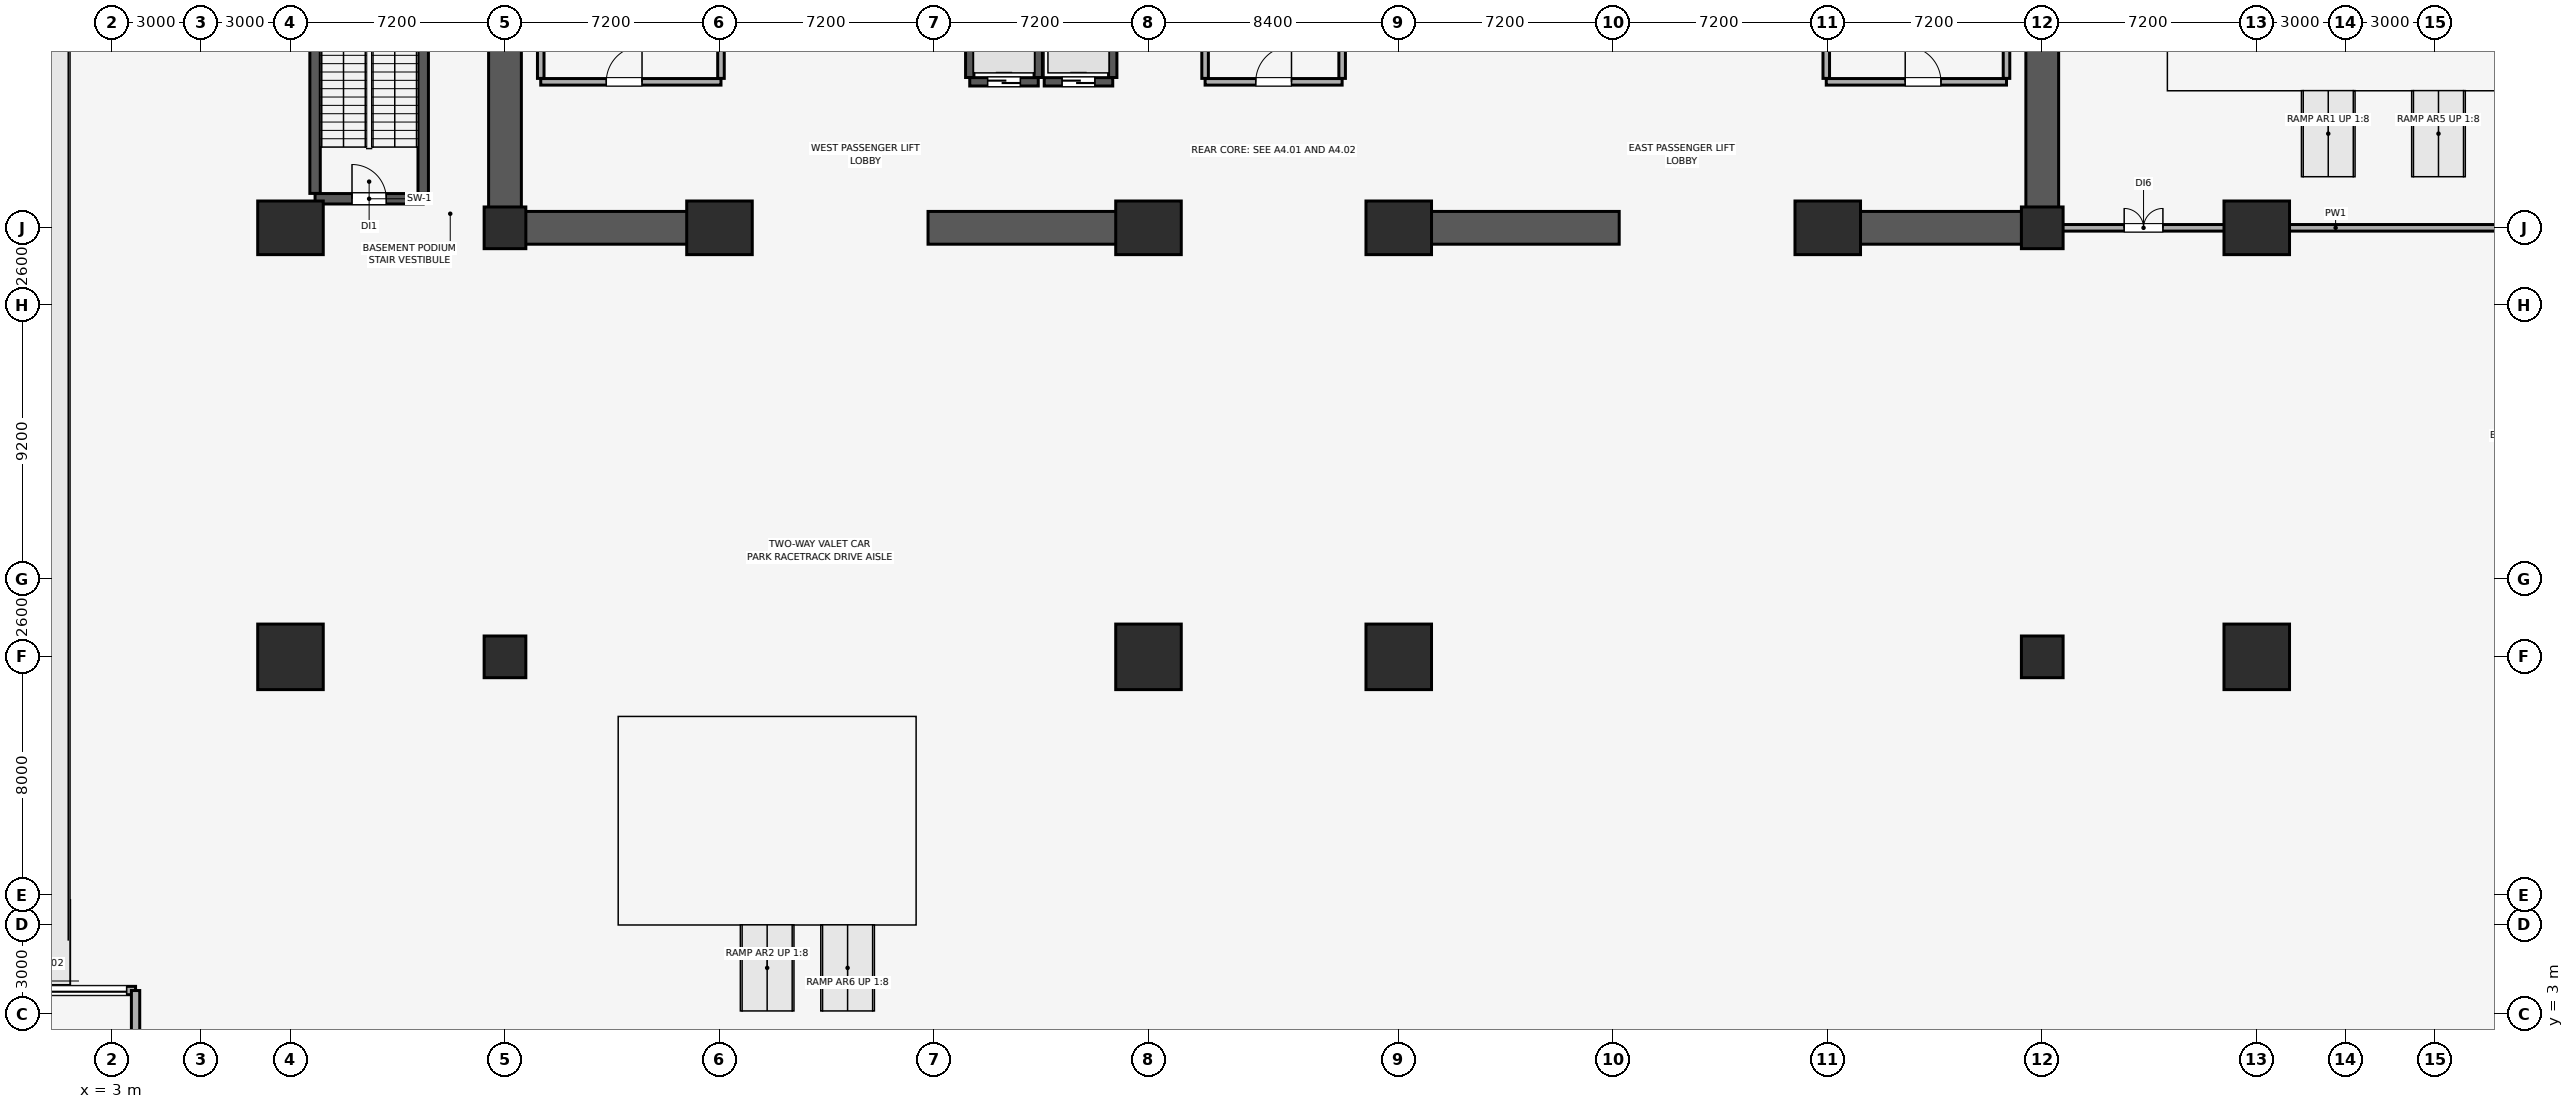
"""IFC4 building model, lengths in metres.
Left out: names, types, materials, properties, quantities, classifications, styles, units other than length and angle.
Written with IfcOpenShell. Run it as: python <this file> out.ifc"""

import sys

from ifc_helpers import new_model, si_unit, direction, frame, frame_2d, origin, origin_2d, place, context, subcontext, project, spatial, rectangle, circle, extrude, element, fill, save


model = new_model("IFC4")
c1 = context("Model", 3, precision=1e-05, world=origin(), true_north=direction((0.0, 1.0)))
c2 = subcontext(c1, "Body", "Model", "MODEL_VIEW")
j1 = project(units=[si_unit("LENGTHUNIT", "METRE"), si_unit("PLANEANGLEUNIT", "RADIAN")], contexts=[c1])
p1 = place(None, origin())
s1 = spatial("IfcSite", under=j1, at=p1, CompositionType="ELEMENT")
p2 = place(p1, origin())
s2 = spatial("IfcBuilding", under=s1, at=p2, CompositionType="ELEMENT")
p3 = place(p2, frame((0.0, 0.0, -9.2)))
s3 = spatial("IfcBuildingStorey", under=s2, at=p3, CompositionType="ELEMENT", Elevation=-9.2)
for number, where, z_axis, x_axis in (
    (1, (9.0, 15.0, 0.0), (0.0, 0.0, 1.0), (1.0, 0.0, 0.0)),
    (2, (37.8, 15.0, 0.0), (0.0, 0.0, 1.0), (1.0, 0.0, 0.0)),
    (3, (46.2, 15.0, 0.0), (0.0, 0.0, 1.0), (1.0, 0.0, 0.0)),
    (4, (75.0, 15.0, 0.0), (0.0, 0.0, 1.0), (1.0, 0.0, 0.0)),
):
    element("IfcColumn", number, at=place(p3, frame(where, z_axis=z_axis, x_axis=x_axis)), inside=s3, PredefinedType="USERDEFINED", context=c2, shape_type="SweptSolid", body=[
        extrude(circle(Radius=1.1, at=origin_2d()), origin(), (0.0, 0.0, 1.0), 4.3),
    ])
for number, where, z_axis, x_axis in (
    (5, (16.2, 15.0, 0.0), (0.0, 0.0, 1.0), (1.0, 0.0, 0.0)),
    (6, (67.8, 15.0, 0.0), (0.0, 0.0, 1.0), (1.0, 0.0, 0.0)),
):
    element("IfcColumn", number, at=place(p3, frame(where, z_axis=z_axis, x_axis=x_axis)), inside=s3, PredefinedType="COLUMN", context=c2, shape_type="SweptSolid", body=[
        extrude(rectangle(XDim=1.4, YDim=1.4, at=origin_2d()), origin(), (0.0, 0.0, 1.0), 4.3),
    ])
for number, where, z_axis, x_axis in (
    (7, (9.0, 29.4, 0.0), (0.0, 0.0, 1.0), (1.0, 0.0, 0.0)),
    (8, (23.4, 29.4, 0.0), (0.0, 0.0, 1.0), (1.0, 0.0, 0.0)),
    (9, (37.8, 29.4, 0.0), (0.0, 0.0, 1.0), (1.0, 0.0, 0.0)),
    (10, (46.2, 29.4, 0.0), (0.0, 0.0, 1.0), (1.0, 0.0, 0.0)),
    (11, (60.6, 29.4, 0.0), (0.0, 0.0, 1.0), (1.0, 0.0, 0.0)),
    (12, (75.0, 29.4, 0.0), (0.0, 0.0, 1.0), (1.0, 0.0, 0.0)),
):
    element("IfcColumn", number, at=place(p3, frame(where, z_axis=z_axis, x_axis=x_axis)), inside=s3, PredefinedType="USERDEFINED", context=c2, shape_type="SweptSolid", body=[
        extrude(rectangle(XDim=2.2, YDim=1.8, at=origin_2d()), origin(), (0.0, 0.0, 1.0), 4.3),
    ])
for number, where, z_axis, x_axis in (
    (13, (16.2, 29.4, 0.0), (0.0, 0.0, 1.0), (1.0, 0.0, 0.0)),
    (14, (67.8, 29.4, 0.0), (0.0, 0.0, 1.0), (1.0, 0.0, 0.0)),
):
    element("IfcColumn", number, at=place(p3, frame(where, z_axis=z_axis, x_axis=x_axis)), inside=s3, PredefinedType="COLUMN", context=c2, shape_type="SweptSolid", body=[
        extrude(rectangle(XDim=1.4, YDim=1.4, at=origin_2d()), origin(), (0.0, 0.0, 1.0), 4.3),
    ])
p4 = place(p3, frame((-3.2, 3.8, 0.0), z_axis=(0.0, 0.0, 1.0), x_axis=(1.0, 0.0, 0.0)))
e15 = element("IfcWall", 15, at=p4, inside=s3, PredefinedType="SOLIDWALL", context=c2, shape_type="SweptSolid", body=[
    extrude(rectangle(XDim=7.0, YDim=0.28, at=frame_2d((3.5, 0.0))), origin(), (0.0, 0.0, 1.0), 4.3),
])
p5 = place(p4, frame((0.3, 0.0, 0.0)))
e16 = element("IfcOpeningElement", 16, at=p5, cuts=e15, PredefinedType="OPENING", context=c2, shape_type="SweptSolid", body=[
    extrude(rectangle(XDim=6.4, YDim=3.1, at=frame_2d((3.2, 1.55))), frame((0.0, 0.15, 0.0), z_axis=(0.0, -1.0, 0.0), x_axis=(1.0, 0.0, 0.0)), (0.0, 0.0, 1.0), 0.3),
])
p6 = place(p3, frame((3.8, 3.8, 0.0), z_axis=(0.0, 0.0, 1.0), x_axis=(0.0, -1.0, 0.0)))
e17 = element("IfcWall", 17, at=p6, inside=s3, PredefinedType="SOLIDWALL", context=c2, shape_type="SweptSolid", body=[
    extrude(rectangle(XDim=6.3, YDim=0.28, at=frame_2d((3.15, 0.0))), origin(), (0.0, 0.0, 1.0), 4.3),
])
for number, where, z_axis, x_axis in (
    (18, (16.2, 29.4, 0.0), (0.0, 0.0, 1.0), (0.0, 1.0, 0.0)),
    (19, (67.8, 29.4, 0.0), (0.0, 0.0, 1.0), (0.0, 1.0, 0.0)),
):
    element("IfcWall", number, at=place(p3, frame(where, z_axis=z_axis, x_axis=x_axis)), inside=s3, PredefinedType="SHEAR", context=c2, shape_type="SweptSolid", body=[
        extrude(rectangle(XDim=19.2, YDim=1.1, at=frame_2d((9.6, 0.0))), origin(), (0.0, 0.0, 1.0), 4.3),
    ])
p7 = place(p3, frame((16.755, 29.4, 0.0), z_axis=(0.0, 0.0, 1.0), x_axis=(1.0, 0.0, 0.0)))
e20 = element("IfcWall", 20, at=p7, inside=s3, PredefinedType="SHEAR", context=c2, shape_type="SweptSolid", body=[
    extrude(rectangle(XDim=6.845, YDim=1.1, at=frame_2d((3.423, 0.0))), origin(), (0.0, 0.0, 1.0), 4.3),
])
for number, where, z_axis, x_axis in (
    (21, (30.4, 29.4, 0.0), (0.0, 0.0, 1.0), (1.0, 0.0, 0.0)),
    (22, (46.0, 29.4, 0.0), (0.0, 0.0, 1.0), (1.0, 0.0, 0.0)),
):
    element("IfcWall", number, at=place(p3, frame(where, z_axis=z_axis, x_axis=x_axis)), inside=s3, PredefinedType="SHEAR", context=c2, shape_type="SweptSolid", body=[
        extrude(rectangle(XDim=7.6, YDim=1.1, at=frame_2d((3.8, 0.0))), origin(), (0.0, 0.0, 1.0), 4.3),
    ])
p8 = place(p3, frame((60.4, 29.4, 0.0), z_axis=(0.0, 0.0, 1.0), x_axis=(1.0, 0.0, 0.0)))
e23 = element("IfcWall", 23, at=p8, inside=s3, PredefinedType="SHEAR", context=c2, shape_type="SweptSolid", body=[
    extrude(rectangle(XDim=6.845, YDim=1.1, at=frame_2d((3.423, 0.0))), origin(), (0.0, 0.0, 1.0), 4.3),
])
p9 = place(p3, frame((9.825, 30.375, 0.0), z_axis=(0.0, 0.0, 1.0), x_axis=(1.0, 0.0, 0.0)))
e24 = element("IfcWall", 24, at=p9, inside=s3, PredefinedType="SHEAR", context=c2, shape_type="SweptSolid", body=[
    extrude(rectangle(XDim=3.63, YDim=0.35, at=frame_2d((1.815, 0.0))), origin(), (0.0, 0.0, 1.0), 4.3),
])
p10 = place(p9, frame((1.24, 0.0, 0.0)))
e25 = element("IfcOpeningElement", 25, at=p10, cuts=e24, PredefinedType="OPENING", context=c2, shape_type="SweptSolid", body=[
    extrude(rectangle(XDim=1.15, YDim=2.15, at=frame_2d((0.575, 1.075))), frame((0.0, 0.185, 0.0), z_axis=(0.0, -1.0, 0.0), x_axis=(1.0, 0.0, 0.0)), (0.0, 0.0, 1.0), 0.37),
])
for number, where, z_axis, x_axis in (
    (26, (9.825, 30.555, 0.0), (0.0, 0.0, 1.0), (0.0, 1.0, 0.0)),
    (27, (13.455, 30.555, 0.0), (0.0, 0.0, 1.0), (0.0, 1.0, 0.0)),
):
    element("IfcWall", number, at=place(p3, frame(where, z_axis=z_axis, x_axis=x_axis)), inside=s3, PredefinedType="SHEAR", context=c2, shape_type="SweptSolid", body=[
        extrude(rectangle(XDim=8.44, YDim=0.35, at=frame_2d((4.22, 0.0))), origin(), (0.0, 0.0, 1.0), 4.3),
    ])
p11 = place(p3, frame((31.8, 34.3, 0.0), z_axis=(0.0, 0.0, 1.0), x_axis=(1.0, 0.0, 0.0)))
e28 = element("IfcWall", 28, at=p11, inside=s3, PredefinedType="SHEAR", context=c2, shape_type="SweptSolid", body=[
    extrude(rectangle(XDim=2.3, YDim=0.28, at=frame_2d((1.15, 0.0))), origin(), (0.0, 0.0, 1.0), 4.3),
])
p12 = place(p11, frame((0.6, 0.0, 0.0)))
e29 = element("IfcOpeningElement", 29, at=p12, cuts=e28, PredefinedType="OPENING", context=c2, shape_type="SweptSolid", body=[
    extrude(rectangle(XDim=1.1, YDim=2.2, at=frame_2d((0.55, 1.1))), frame((0.0, 0.15, 0.0), z_axis=(0.0, -1.0, 0.0), x_axis=(1.0, 0.0, 0.0)), (0.0, 0.0, 1.0), 0.3),
])
for number, where, z_axis, x_axis in (
    (30, (31.8, 34.445, 0.0), (0.0, 0.0, 1.0), (0.0, 1.0, 0.0)),
    (31, (34.1, 34.445, 0.0), (0.0, 0.0, 1.0), (0.0, 1.0, 0.0)),
):
    element("IfcWall", number, at=place(p3, frame(where, z_axis=z_axis, x_axis=x_axis)), inside=s3, PredefinedType="SHEAR", context=c2, shape_type="SweptSolid", body=[
        extrude(rectangle(XDim=2.01, YDim=0.28, at=frame_2d((1.005, 0.0))), origin(), (0.0, 0.0, 1.0), 4.3),
    ])
p13 = place(p3, frame((34.3, 34.3, 0.0), z_axis=(0.0, 0.0, 1.0), x_axis=(1.0, 0.0, 0.0)))
e32 = element("IfcWall", 32, at=p13, inside=s3, PredefinedType="SHEAR", context=c2, shape_type="SweptSolid", body=[
    extrude(rectangle(XDim=2.3, YDim=0.28, at=frame_2d((1.15, 0.0))), origin(), (0.0, 0.0, 1.0), 4.3),
])
p14 = place(p13, frame((0.6, 0.0, 0.0)))
e33 = element("IfcOpeningElement", 33, at=p14, cuts=e32, PredefinedType="OPENING", context=c2, shape_type="SweptSolid", body=[
    extrude(rectangle(XDim=1.1, YDim=2.2, at=frame_2d((0.55, 1.1))), frame((0.0, 0.15, 0.0), z_axis=(0.0, -1.0, 0.0), x_axis=(1.0, 0.0, 0.0)), (0.0, 0.0, 1.0), 0.3),
])
p15 = place(p3, frame((36.6, 34.445, 0.0), z_axis=(0.0, 0.0, 1.0), x_axis=(0.0, 1.0, 0.0)))
e34 = element("IfcWall", 34, at=p15, inside=s3, PredefinedType="SHEAR", context=c2, shape_type="SweptSolid", body=[
    extrude(rectangle(XDim=2.01, YDim=0.28, at=frame_2d((1.005, 0.0))), origin(), (0.0, 0.0, 1.0), 4.3),
])
p16 = place(p3, frame((17.4, 34.3, 0.0), z_axis=(0.0, 0.0, 1.0), x_axis=(1.0, 0.0, 0.0)))
e35 = element("IfcWall", 35, at=p16, inside=s3, PredefinedType="PARTITIONING", context=c2, shape_type="SweptSolid", body=[
    extrude(rectangle(XDim=6.05, YDim=0.22, at=frame_2d((3.025, 0.0))), origin(), (0.0, 0.0, 1.0), 4.3),
])
p17 = place(p16, frame((2.2, 0.0, 0.0)))
e36 = element("IfcOpeningElement", 36, at=p17, cuts=e35, PredefinedType="OPENING", context=c2, shape_type="SweptSolid", body=[
    extrude(rectangle(XDim=1.2, YDim=2.15, at=frame_2d((0.6, 1.075))), frame((0.0, 0.12, 0.0), z_axis=(0.0, -1.0, 0.0), x_axis=(1.0, 0.0, 0.0)), (0.0, 0.0, 1.0), 0.24),
])
p18 = place(p3, frame((17.4, 34.415, 0.0), z_axis=(0.0, 0.0, 1.0), x_axis=(0.0, 1.0, 0.0)))
e37 = element("IfcWall", 37, at=p18, inside=s3, PredefinedType="PARTITIONING", context=c2, shape_type="SweptSolid", body=[
    extrude(rectangle(XDim=5.43, YDim=0.22, at=frame_2d((2.715, 0.0))), origin(), (0.0, 0.0, 1.0), 4.3),
])
p19 = place(p3, frame((23.45, 34.415, 0.0), z_axis=(0.0, 0.0, 1.0), x_axis=(0.0, 1.0, 0.0)))
e38 = element("IfcWall", 38, at=p19, inside=s3, PredefinedType="PARTITIONING", context=c2, shape_type="SweptSolid", body=[
    extrude(rectangle(XDim=5.64, YDim=0.22, at=frame_2d((2.82, 0.0))), origin(), (0.0, 0.0, 1.0), 4.3),
])
p20 = place(p3, frame((60.55, 34.3, 0.0), z_axis=(0.0, 0.0, 1.0), x_axis=(1.0, 0.0, 0.0)))
e39 = element("IfcWall", 39, at=p20, inside=s3, PredefinedType="PARTITIONING", context=c2, shape_type="SweptSolid", body=[
    extrude(rectangle(XDim=6.05, YDim=0.22, at=frame_2d((3.025, 0.0))), origin(), (0.0, 0.0, 1.0), 4.3),
])
p21 = place(p20, frame((2.65, 0.0, 0.0)))
e40 = element("IfcOpeningElement", 40, at=p21, cuts=e39, PredefinedType="OPENING", context=c2, shape_type="SweptSolid", body=[
    extrude(rectangle(XDim=1.2, YDim=2.15, at=frame_2d((0.6, 1.075))), frame((0.0, 0.12, 0.0), z_axis=(0.0, -1.0, 0.0), x_axis=(1.0, 0.0, 0.0)), (0.0, 0.0, 1.0), 0.24),
])
p22 = place(p3, frame((60.55, 34.415, 0.0), z_axis=(0.0, 0.0, 1.0), x_axis=(0.0, 1.0, 0.0)))
e41 = element("IfcWall", 41, at=p22, inside=s3, PredefinedType="PARTITIONING", context=c2, shape_type="SweptSolid", body=[
    extrude(rectangle(XDim=5.64, YDim=0.22, at=frame_2d((2.82, 0.0))), origin(), (0.0, 0.0, 1.0), 4.3),
])
p23 = place(p3, frame((66.6, 34.415, 0.0), z_axis=(0.0, 0.0, 1.0), x_axis=(0.0, 1.0, 0.0)))
e42 = element("IfcWall", 42, at=p23, inside=s3, PredefinedType="PARTITIONING", context=c2, shape_type="SweptSolid", body=[
    extrude(rectangle(XDim=5.43, YDim=0.22, at=frame_2d((2.715, 0.0))), origin(), (0.0, 0.0, 1.0), 4.3),
])
p24 = place(p3, frame((39.7, 34.3, 0.0), z_axis=(0.0, 0.0, 1.0), x_axis=(1.0, 0.0, 0.0)))
e43 = element("IfcWall", 43, at=p24, inside=s3, PredefinedType="PARTITIONING", context=c2, shape_type="SweptSolid", body=[
    extrude(rectangle(XDim=4.6, YDim=0.22, at=frame_2d((2.3, 0.0))), origin(), (0.0, 0.0, 1.0), 4.3),
])
p25 = place(p24, frame((1.7, 0.0, 0.0)))
e44 = element("IfcOpeningElement", 44, at=p25, cuts=e43, PredefinedType="OPENING", context=c2, shape_type="SweptSolid", body=[
    extrude(rectangle(XDim=1.2, YDim=2.15, at=frame_2d((0.6, 1.075))), frame((0.0, 0.12, 0.0), z_axis=(0.0, -1.0, 0.0), x_axis=(1.0, 0.0, 0.0)), (0.0, 0.0, 1.0), 0.24),
])
for number, where, z_axis, x_axis in (
    (45, (39.7, 34.415, 0.0), (0.0, 0.0, 1.0), (0.0, 1.0, 0.0)),
    (46, (44.3, 34.415, 0.0), (0.0, 0.0, 1.0), (0.0, 1.0, 0.0)),
):
    element("IfcWall", number, at=place(p3, frame(where, z_axis=z_axis, x_axis=x_axis)), inside=s3, PredefinedType="PARTITIONING", context=c2, shape_type="SweptSolid", body=[
        extrude(rectangle(XDim=5.785, YDim=0.22, at=frame_2d((2.893, 0.0))), origin(), (0.0, 0.0, 1.0), 4.3),
    ])
p26 = place(p3, frame((68.4, 29.4, 0.0), z_axis=(0.0, 0.0, 1.0), x_axis=(1.0, 0.0, 0.0)))
e47 = element("IfcWall", 47, at=p26, inside=s3, PredefinedType="PARTITIONING", context=c2, shape_type="SweptSolid", body=[
    extrude(rectangle(XDim=18.495, YDim=0.22, at=frame_2d((9.248, 0.0))), origin(), (0.0, 0.0, 1.0), 3.5),
])
p27 = place(p26, frame((2.15, 0.0, 0.0)))
e48 = element("IfcOpeningElement", 48, at=p27, cuts=e47, PredefinedType="OPENING", context=c2, shape_type="SweptSolid", body=[
    extrude(rectangle(XDim=1.3, YDim=2.2, at=frame_2d((0.65, 1.1))), frame((0.0, 0.12, 0.0), z_axis=(0.0, -1.0, 0.0), x_axis=(1.0, 0.0, 0.0)), (0.0, 0.0, 1.0), 0.24),
])
p28 = place(p5, origin())
e49 = element("IfcDoor", 49, at=p28, inside=s3, OperationType="SINGLE_SWING_LEFT", PredefinedType="GATE", context=c2, shape_type="SweptSolid", body=[
    extrude(rectangle(XDim=6.4, YDim=3.1, at=frame_2d((3.2, 1.55))), frame((0.0, 0.025, 0.0), z_axis=(0.0, -1.0, 0.0), x_axis=(1.0, 0.0, 0.0)), (0.0, 0.0, 1.0), 0.05),
])
fill(e16, e49)
p29 = place(p10, origin())
e50 = element("IfcDoor", 50, at=p29, inside=s3, OperationType="SINGLE_SWING_LEFT", PredefinedType="DOOR", context=c2, shape_type="SweptSolid", body=[
    extrude(rectangle(XDim=1.15, YDim=2.15, at=frame_2d((0.575, 1.075))), frame((0.0, 0.025, 0.0), z_axis=(0.0, -1.0, 0.0), x_axis=(1.0, 0.0, 0.0)), (0.0, 0.0, 1.0), 0.05),
])
fill(e25, e50)
p30 = place(p12, origin())
e51 = element("IfcDoor", 51, at=p30, inside=s3, OperationType="DOUBLE_DOOR_SLIDING", PredefinedType="DOOR", context=c2, shape_type="SweptSolid", body=[
    extrude(rectangle(XDim=1.1, YDim=2.2, at=frame_2d((0.55, 1.1))), frame((0.0, 0.025, 0.0), z_axis=(0.0, -1.0, 0.0), x_axis=(1.0, 0.0, 0.0)), (0.0, 0.0, 1.0), 0.05),
])
fill(e29, e51)
p31 = place(p14, origin())
e52 = element("IfcDoor", 52, at=p31, inside=s3, OperationType="DOUBLE_DOOR_SLIDING", PredefinedType="DOOR", context=c2, shape_type="SweptSolid", body=[
    extrude(rectangle(XDim=1.1, YDim=2.2, at=frame_2d((0.55, 1.1))), frame((0.0, 0.025, 0.0), z_axis=(0.0, -1.0, 0.0), x_axis=(1.0, 0.0, 0.0)), (0.0, 0.0, 1.0), 0.05),
])
fill(e33, e52)
p32 = place(p17, origin())
e53 = element("IfcDoor", 53, at=p32, inside=s3, OperationType="SINGLE_SWING_RIGHT", PredefinedType="DOOR", context=c2, shape_type="SweptSolid", body=[
    extrude(rectangle(XDim=1.2, YDim=2.15, at=frame_2d((0.6, 1.075))), frame((0.0, 0.025, 0.0), z_axis=(0.0, -1.0, 0.0), x_axis=(1.0, 0.0, 0.0)), (0.0, 0.0, 1.0), 0.05),
])
fill(e36, e53)
p33 = place(p21, origin())
e54 = element("IfcDoor", 54, at=p33, inside=s3, OperationType="SINGLE_SWING_LEFT", PredefinedType="DOOR", context=c2, shape_type="SweptSolid", body=[
    extrude(rectangle(XDim=1.2, YDim=2.15, at=frame_2d((0.6, 1.075))), frame((0.0, 0.025, 0.0), z_axis=(0.0, -1.0, 0.0), x_axis=(1.0, 0.0, 0.0)), (0.0, 0.0, 1.0), 0.05),
])
fill(e40, e54)
p34 = place(p25, origin())
e55 = element("IfcDoor", 55, at=p34, inside=s3, OperationType="SINGLE_SWING_RIGHT", PredefinedType="DOOR", context=c2, shape_type="SweptSolid", body=[
    extrude(rectangle(XDim=1.2, YDim=2.15, at=frame_2d((0.6, 1.075))), frame((0.0, 0.025, 0.0), z_axis=(0.0, -1.0, 0.0), x_axis=(1.0, 0.0, 0.0)), (0.0, 0.0, 1.0), 0.05),
])
fill(e44, e55)
p35 = place(p27, origin())
e56 = element("IfcDoor", 56, at=p35, inside=s3, OperationType="DOUBLE_DOOR_SINGLE_SWING", PredefinedType="DOOR", context=c2, shape_type="SweptSolid", body=[
    extrude(rectangle(XDim=1.3, YDim=2.2, at=frame_2d((0.65, 1.1))), frame((0.0, 0.025, 0.0), z_axis=(0.0, -1.0, 0.0), x_axis=(1.0, 0.0, 0.0)), (0.0, 0.0, 1.0), 0.05),
])
fill(e48, e56)
save(model, sys.argv[1])
